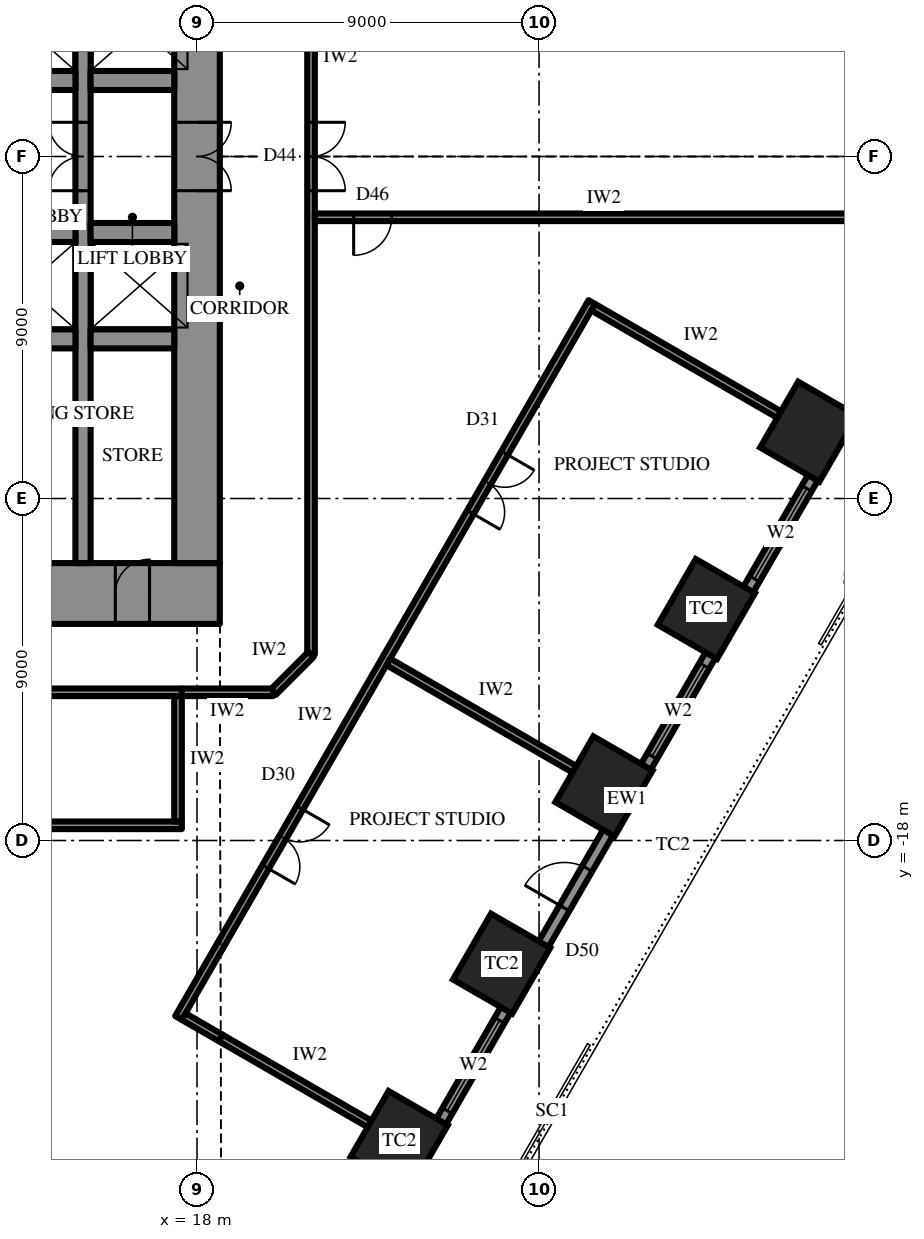
"""IFC4 building model, lengths in metres.
Left out: names, types, materials, properties, quantities, classifications, styles, units other than length and angle.
Written with IfcOpenShell. Run it as: python <this file> out.ifc"""

import sys

from ifc_helpers import new_model, si_unit, direction, frame, frame_2d, origin, origin_2d, place, context, subcontext, project, spatial, rectangle, extrude, element, fill, save


model = new_model("IFC4")
c1 = context("Model", 3, precision=1e-05, world=origin(), true_north=direction((0.0, 1.0)))
c2 = subcontext(c1, "Body", "Model", "MODEL_VIEW")
j1 = project(units=[si_unit("LENGTHUNIT", "METRE"), si_unit("PLANEANGLEUNIT", "RADIAN")], contexts=[c1])
p1 = place(None, origin())
s1 = spatial("IfcSite", under=j1, at=p1, CompositionType="ELEMENT")
p2 = place(p1, origin())
s2 = spatial("IfcBuilding", under=s1, at=p2, CompositionType="ELEMENT")
p3 = place(p2, frame((0.0, 0.0, 61.3)))
s3 = spatial("IfcBuildingStorey", under=s2, at=p3, CompositionType="ELEMENT", Elevation=61.3)
for number, where, z_axis, x_axis in (
    (1, (23.32, -25.908, 0.0), (0.0, 0.0, 1.0), (0.5, 0.866, 0.0)),
    (2, (26.014, -21.242, 0.0), (0.0, 0.0, 1.0), (0.5, 0.866, 0.0)),
    (3, (28.709, -16.575, 0.0), (0.0, 0.0, 1.0), (0.5, 0.866, 0.0)),
    (4, (31.403, -11.908, 0.0), (0.0, 0.0, 1.0), (0.5, 0.866, 0.0)),
    (5, (34.097, -7.242, 0.0), (0.0, 0.0, 1.0), (0.5, 0.866, 0.0)),
):
    element("IfcColumn", number, at=place(p3, frame(where, z_axis=z_axis, x_axis=x_axis)), inside=s3, PredefinedType="COLUMN", context=c2, shape_type="SweptSolid", body=[
        extrude(rectangle(XDim=2.0, YDim=1.8, at=origin_2d()), origin(), (0.0, 0.0, 1.0), 4.2),
    ])
p4 = place(p3, frame((18.6, -11.5, 0.0), z_axis=(0.0, 0.0, 1.0), x_axis=(-1.0, 0.0, 0.0)))
e6 = element("IfcWall", 6, at=p4, inside=s3, PredefinedType="SHEAR", context=c2, shape_type="SweptSolid", body=[
    extrude(rectangle(XDim=37.2, YDim=1.6, at=frame_2d((18.6, 0.0))), origin(), (0.0, 0.0, 1.0), 4.2),
])
p5 = place(p4, frame((19.45, 0.0, 0.0)))
e7 = element("IfcOpeningElement", 7, at=p5, cuts=e6, PredefinedType="OPENING", context=c2, shape_type="SweptSolid", body=[
    extrude(rectangle(XDim=0.9, YDim=2.2, at=frame_2d((0.45, 1.1))), frame((0.0, 0.81, 0.0), z_axis=(0.0, -1.0, 0.0), x_axis=(1.0, 0.0, 0.0)), (0.0, 0.0, 1.0), 1.62),
])
p6 = place(p4, frame((22.45, 0.0, 0.0)))
e8 = element("IfcOpeningElement", 8, at=p6, cuts=e6, PredefinedType="OPENING", context=c2, shape_type="SweptSolid", body=[
    extrude(rectangle(XDim=0.9, YDim=2.2, at=frame_2d((0.45, 1.1))), frame((0.0, 0.81, 0.0), z_axis=(0.0, -1.0, 0.0), x_axis=(1.0, 0.0, 0.0)), (0.0, 0.0, 1.0), 1.62),
])
p7 = place(p4, frame((25.5, 0.0, 0.0)))
e9 = element("IfcOpeningElement", 9, at=p7, cuts=e6, PredefinedType="OPENING", context=c2, shape_type="SweptSolid", body=[
    extrude(rectangle(XDim=1.0, YDim=2.2, at=frame_2d((0.5, 1.1))), frame((0.0, 0.81, 0.0), z_axis=(0.0, -1.0, 0.0), x_axis=(1.0, 0.0, 0.0)), (0.0, 0.0, 1.0), 1.62),
])
p8 = place(p4, frame((1.85, 0.0, 0.0)))
e10 = element("IfcOpeningElement", 10, at=p8, cuts=e6, PredefinedType="OPENING", context=c2, shape_type="SweptSolid", body=[
    extrude(rectangle(XDim=0.9, YDim=2.2, at=frame_2d((0.45, 1.1))), frame((0.0, 0.81, 0.0), z_axis=(0.0, -1.0, 0.0), x_axis=(1.0, 0.0, 0.0)), (0.0, 0.0, 1.0), 1.62),
])
p9 = place(p4, frame((4.6, 0.0, 0.0)))
e11 = element("IfcOpeningElement", 11, at=p9, cuts=e6, PredefinedType="OPENING", context=c2, shape_type="SweptSolid", body=[
    extrude(rectangle(XDim=0.9, YDim=2.2, at=frame_2d((0.45, 1.1))), frame((0.0, 0.81, 0.0), z_axis=(0.0, -1.0, 0.0), x_axis=(1.0, 0.0, 0.0)), (0.0, 0.0, 1.0), 1.62),
])
p10 = place(p4, frame((7.75, 0.0, 0.0)))
e12 = element("IfcOpeningElement", 12, at=p10, cuts=e6, PredefinedType="OPENING", context=c2, shape_type="SweptSolid", body=[
    extrude(rectangle(XDim=0.9, YDim=2.2, at=frame_2d((0.45, 1.1))), frame((0.0, 0.81, 0.0), z_axis=(0.0, -1.0, 0.0), x_axis=(1.0, 0.0, 0.0)), (0.0, 0.0, 1.0), 1.62),
])
p11 = place(p4, frame((28.55, 0.0, 0.0)))
e13 = element("IfcOpeningElement", 13, at=p11, cuts=e6, PredefinedType="OPENING", context=c2, shape_type="SweptSolid", body=[
    extrude(rectangle(XDim=0.9, YDim=2.2, at=frame_2d((0.45, 1.1))), frame((0.0, 0.81, 0.0), z_axis=(0.0, -1.0, 0.0), x_axis=(1.0, 0.0, 0.0)), (0.0, 0.0, 1.0), 1.62),
])
p12 = place(p4, frame((31.7, 0.0, 0.0)))
e14 = element("IfcOpeningElement", 14, at=p12, cuts=e6, PredefinedType="OPENING", context=c2, shape_type="SweptSolid", body=[
    extrude(rectangle(XDim=0.9, YDim=2.2, at=frame_2d((0.45, 1.1))), frame((0.0, 0.81, 0.0), z_axis=(0.0, -1.0, 0.0), x_axis=(1.0, 0.0, 0.0)), (0.0, 0.0, 1.0), 1.62),
])
p13 = place(p4, frame((34.45, 0.0, 0.0)))
e15 = element("IfcOpeningElement", 15, at=p13, cuts=e6, PredefinedType="OPENING", context=c2, shape_type="SweptSolid", body=[
    extrude(rectangle(XDim=0.9, YDim=2.2, at=frame_2d((0.45, 1.1))), frame((0.0, 0.81, 0.0), z_axis=(0.0, -1.0, 0.0), x_axis=(1.0, 0.0, 0.0)), (0.0, 0.0, 1.0), 1.62),
])
p14 = place(p3, frame((18.0, -10.7, 0.0), z_axis=(0.0, 0.0, 1.0), x_axis=(0.0, 1.0, 0.0)))
e16 = element("IfcWall", 16, at=p14, inside=s3, PredefinedType="SHEAR", context=c2, shape_type="SweptSolid", body=[
    extrude(rectangle(XDim=21.4, YDim=1.2, at=frame_2d((10.7, 0.0))), origin(), (0.0, 0.0, 1.0), 4.2),
])
p15 = place(p14, frame((9.8, 0.0, 0.0)))
e17 = element("IfcOpeningElement", 17, at=p15, cuts=e16, PredefinedType="OPENING", context=c2, shape_type="SweptSolid", body=[
    extrude(rectangle(XDim=1.8, YDim=2.4, at=frame_2d((0.9, 1.2))), frame((0.0, 0.61, 0.0), z_axis=(0.0, -1.0, 0.0), x_axis=(1.0, 0.0, 0.0)), (0.0, 0.0, 1.0), 1.22),
])
p16 = place(p3, frame((15.0, -10.7, 0.0), z_axis=(0.0, 0.0, 1.0), x_axis=(0.0, 1.0, 0.0)))
e18 = element("IfcWall", 18, at=p16, inside=s3, PredefinedType="SHEAR", context=c2, shape_type="SweptSolid", body=[
    extrude(rectangle(XDim=21.4, YDim=0.4, at=frame_2d((10.7, 0.0))), origin(), (0.0, 0.0, 1.0), 4.2),
])
p17 = place(p16, frame((9.8, 0.0, 0.0)))
e19 = element("IfcOpeningElement", 19, at=p17, cuts=e18, PredefinedType="OPENING", context=c2, shape_type="SweptSolid", body=[
    extrude(rectangle(XDim=1.8, YDim=2.4, at=frame_2d((0.9, 1.2))), frame((0.0, 0.21, 0.0), z_axis=(0.0, -1.0, 0.0), x_axis=(1.0, 0.0, 0.0)), (0.0, 0.0, 1.0), 0.42),
])
p18 = place(p3, frame((12.3, 2.0, 0.0), z_axis=(0.0, 0.0, 1.0), x_axis=(1.0, 0.0, 0.0)))
e20 = element("IfcWall", 20, at=p18, inside=s3, PredefinedType="SHEAR", context=c2, shape_type="SweptSolid", body=[
    extrude(rectangle(XDim=2.5, YDim=0.5, at=frame_2d((1.25, 0.0))), origin(), (0.0, 0.0, 1.0), 4.2),
])
for number, where, z_axis, x_axis in (
    (21, (15.2, 2.0, 0.0), (0.0, 0.0, 1.0), (1.0, 0.0, 0.0)),
    (22, (17.4, -2.0, 0.0), (0.0, 0.0, 1.0), (-1.0, 0.0, 0.0)),
):
    element("IfcWall", number, at=place(p3, frame(where, z_axis=z_axis, x_axis=x_axis)), inside=s3, PredefinedType="SHEAR", context=c2, shape_type="SweptSolid", body=[
        extrude(rectangle(XDim=2.2, YDim=0.5, at=frame_2d((1.1, 0.0))), origin(), (0.0, 0.0, 1.0), 4.2),
    ])
p19 = place(p3, frame((14.8, -2.0, 0.0), z_axis=(0.0, 0.0, 1.0), x_axis=(-1.0, 0.0, 0.0)))
e23 = element("IfcWall", 23, at=p19, inside=s3, PredefinedType="SHEAR", context=c2, shape_type="SweptSolid", body=[
    extrude(rectangle(XDim=2.5, YDim=0.5, at=frame_2d((1.25, 0.0))), origin(), (0.0, 0.0, 1.0), 4.2),
])
p20 = place(p3, frame((17.4, -4.8, 0.0), z_axis=(0.0, 0.0, 1.0), x_axis=(-1.0, 0.0, 0.0)))
e24 = element("IfcWall", 24, at=p20, inside=s3, PredefinedType="SHEAR", context=c2, shape_type="SweptSolid", body=[
    extrude(rectangle(XDim=2.2, YDim=0.5, at=frame_2d((1.1, 0.0))), origin(), (0.0, 0.0, 1.0), 4.2),
])
p21 = place(p3, frame((14.8, -4.8, 0.0), z_axis=(0.0, 0.0, 1.0), x_axis=(-1.0, 0.0, 0.0)))
e25 = element("IfcWall", 25, at=p21, inside=s3, PredefinedType="SHEAR", context=c2, shape_type="SweptSolid", body=[
    extrude(rectangle(XDim=2.5, YDim=0.5, at=frame_2d((1.25, 0.0))), origin(), (0.0, 0.0, 1.0), 4.2),
])
p22 = place(p3, frame((21.232, -30.925, 0.0), z_axis=(0.0, 0.0, 1.0), x_axis=(0.499999163675, 0.866025886636, 0.0)))
e26 = element("IfcWall", 26, at=p22, inside=s3, PredefinedType="SOLIDWALL", context=c2, shape_type="SweptSolid", body=[
    extrude(rectangle(XDim=32.332, YDim=0.3, at=frame_2d((16.166, 0.0))), origin(), (0.0, 0.0, 1.0), 2.7),
])
p23 = place(p22, frame((1.319, 0.0, 0.6)))
e27 = element("IfcOpeningElement", 27, at=p23, cuts=e26, PredefinedType="OPENING", context=c2, shape_type="SweptSolid", body=[
    extrude(rectangle(XDim=2.75, YDim=1.85, at=frame_2d((1.375, 0.925))), frame((0.0, 0.16, 0.0), z_axis=(0.0, -1.0, 0.0), x_axis=(1.0, 0.0, 0.0)), (0.0, 0.0, 1.0), 0.32),
])
p24 = place(p22, frame((6.708, 0.0, 0.6)))
e28 = element("IfcOpeningElement", 28, at=p24, cuts=e26, PredefinedType="OPENING", context=c2, shape_type="SweptSolid", body=[
    extrude(rectangle(XDim=2.75, YDim=1.85, at=frame_2d((1.375, 0.925))), frame((0.0, 0.16, 0.0), z_axis=(0.0, -1.0, 0.0), x_axis=(1.0, 0.0, 0.0)), (0.0, 0.0, 1.0), 0.32),
])
p25 = place(p22, frame((12.872, 0.0, 0.0)))
e29 = element("IfcOpeningElement", 29, at=p25, cuts=e26, PredefinedType="OPENING", context=c2, shape_type="SweptSolid", body=[
    extrude(rectangle(XDim=1.2, YDim=2.4, at=frame_2d((0.6, 1.2))), frame((0.0, 0.16, 0.0), z_axis=(0.0, -1.0, 0.0), x_axis=(1.0, 0.0, 0.0)), (0.0, 0.0, 1.0), 0.32),
])
p26 = place(p22, frame((17.485, 0.0, 0.6)))
e30 = element("IfcOpeningElement", 30, at=p26, cuts=e26, PredefinedType="OPENING", context=c2, shape_type="SweptSolid", body=[
    extrude(rectangle(XDim=2.75, YDim=1.85, at=frame_2d((1.375, 0.925))), frame((0.0, 0.16, 0.0), z_axis=(0.0, -1.0, 0.0), x_axis=(1.0, 0.0, 0.0)), (0.0, 0.0, 1.0), 0.32),
])
p27 = place(p22, frame((22.874, 0.0, 0.6)))
e31 = element("IfcOpeningElement", 31, at=p27, cuts=e26, PredefinedType="OPENING", context=c2, shape_type="SweptSolid", body=[
    extrude(rectangle(XDim=2.75, YDim=1.85, at=frame_2d((1.375, 0.925))), frame((0.0, 0.16, 0.0), z_axis=(0.0, -1.0, 0.0), x_axis=(1.0, 0.0, 0.0)), (0.0, 0.0, 1.0), 0.32),
])
p28 = place(p22, frame((28.262, 0.0, 0.6)))
e32 = element("IfcOpeningElement", 32, at=p28, cuts=e26, PredefinedType="OPENING", context=c2, shape_type="SweptSolid", body=[
    extrude(rectangle(XDim=2.75, YDim=1.85, at=frame_2d((1.375, 0.925))), frame((0.0, 0.16, 0.0), z_axis=(0.0, -1.0, 0.0), x_axis=(1.0, 0.0, 0.0)), (0.0, 0.0, 1.0), 0.32),
])
p29 = place(p3, frame((17.6, -14.1, 0.0), z_axis=(0.0, 0.0, 1.0), x_axis=(-1.0, 0.0, 0.0)))
e33 = element("IfcWall", 33, at=p29, inside=s3, PredefinedType="PARTITIONING", context=c2, shape_type="SweptSolid", body=[
    extrude(rectangle(XDim=35.2, YDim=0.2, at=frame_2d((17.6, 0.0))), origin(), (0.0, 0.0, 1.0), 4.0),
])
p30 = place(p3, frame((17.6, -17.6, 0.0), z_axis=(0.0, 0.0, 1.0), x_axis=(-1.0, 0.0, 0.0)))
e34 = element("IfcWall", 34, at=p30, inside=s3, PredefinedType="PARTITIONING", context=c2, shape_type="SweptSolid", body=[
    extrude(rectangle(XDim=35.2, YDim=0.2, at=frame_2d((17.6, 0.0))), origin(), (0.0, 0.0, 1.0), 4.0),
])
p31 = place(p30, frame((16.7, 0.0, 0.0)))
e35 = element("IfcOpeningElement", 35, at=p31, cuts=e34, PredefinedType="OPENING", context=c2, shape_type="SweptSolid", body=[
    extrude(rectangle(XDim=1.8, YDim=2.4, at=frame_2d((0.9, 1.2))), frame((0.0, 0.11, 0.0), z_axis=(0.0, -1.0, 0.0), x_axis=(1.0, 0.0, 0.0)), (0.0, 0.0, 1.0), 0.22),
])
p32 = place(p3, frame((17.5, -14.2, 0.0), z_axis=(0.0, 0.0, 1.0), x_axis=(0.0, -1.0, 0.0)))
e36 = element("IfcWall", 36, at=p32, inside=s3, PredefinedType="PARTITIONING", context=c2, shape_type="SweptSolid", body=[
    extrude(rectangle(XDim=3.3, YDim=0.2, at=frame_2d((1.65, 0.0))), origin(), (0.0, 0.0, 1.0), 4.0),
])
p33 = place(p3, frame((17.511, -22.67, 0.0), z_axis=(0.0, 0.0, 1.0), x_axis=(0.500000289772, 0.866025236485, 0.0)))
e37 = element("IfcWall", 37, at=p33, inside=s3, PredefinedType="PARTITIONING", context=c2, shape_type="SweptSolid", body=[
    extrude(rectangle(XDim=21.754, YDim=0.2, at=frame_2d((10.877, 0.0))), origin(), (0.0, 0.0, 1.0), 4.0),
])
p34 = place(p33, frame((4.589, 0.0, 0.0)))
e38 = element("IfcOpeningElement", 38, at=p34, cuts=e37, PredefinedType="OPENING", context=c2, shape_type="SweptSolid", body=[
    extrude(rectangle(XDim=1.8, YDim=2.4, at=frame_2d((0.9, 1.2))), frame((0.0, 0.11, 0.0), z_axis=(0.0, -1.0, 0.0), x_axis=(1.0, 0.0, 0.0)), (0.0, 0.0, 1.0), 0.22),
])
p35 = place(p33, frame((15.366, 0.0, 0.0)))
e39 = element("IfcOpeningElement", 39, at=p35, cuts=e37, PredefinedType="OPENING", context=c2, shape_type="SweptSolid", body=[
    extrude(rectangle(XDim=1.8, YDim=2.4, at=frame_2d((0.9, 1.2))), frame((0.0, 0.11, 0.0), z_axis=(0.0, -1.0, 0.0), x_axis=(1.0, 0.0, 0.0)), (0.0, 0.0, 1.0), 0.22),
])
p36 = place(p3, frame((17.648, -22.633, 0.0), z_axis=(0.0, 0.0, 1.0), x_axis=(0.86603400694, -0.499985098601, 0.0)))
e40 = element("IfcWall", 40, at=p36, inside=s3, PredefinedType="PARTITIONING", context=c2, shape_type="SweptSolid", body=[
    extrude(rectangle(XDim=1.126, YDim=0.2, at=frame_2d((0.563, 0.0))), origin(), (0.0, 0.0, 1.0), 4.0),
])
p37 = place(p3, frame((18.623, -23.197, 0.0), z_axis=(0.0, 0.0, 1.0), x_axis=(0.866029199568, -0.499993425452, 0.0)))
e41 = element("IfcWall", 41, at=p37, inside=s3, PredefinedType="PARTITIONING", context=c2, shape_type="SweptSolid", body=[
    extrude(rectangle(XDim=4.523, YDim=0.2, at=frame_2d((2.262, 0.0))), origin(), (0.0, 0.0, 1.0), 2.992),
])
p38 = place(p3, frame((23.036, -13.3, 0.0), z_axis=(0.0, 0.0, 1.0), x_axis=(0.866019355129, -0.500010476433, 0.0)))
e42 = element("IfcWall", 42, at=p38, inside=s3, PredefinedType="PARTITIONING", context=c2, shape_type="SweptSolid", body=[
    extrude(rectangle(XDim=5.65, YDim=0.2, at=frame_2d((2.825, 0.0))), origin(), (0.0, 0.0, 1.0), 4.0),
])
p39 = place(p3, frame((28.425, -3.967, 0.0), z_axis=(0.0, 0.0, 1.0), x_axis=(0.866011447264, -0.500024172624, 0.0)))
e43 = element("IfcWall", 43, at=p39, inside=s3, PredefinedType="PARTITIONING", context=c2, shape_type="SweptSolid", body=[
    extrude(rectangle(XDim=5.65, YDim=0.2, at=frame_2d((2.825, 0.0))), origin(), (0.0, 0.0, 1.0), 2.944),
])
p40 = place(p3, frame((21.0, 13.1, 0.0), z_axis=(0.0, 0.0, 1.0), x_axis=(0.0, -1.0, 0.0)))
e44 = element("IfcWall", 44, at=p40, inside=s3, PredefinedType="PARTITIONING", context=c2, shape_type="SweptSolid", body=[
    extrude(rectangle(XDim=26.2, YDim=0.2, at=frame_2d((13.1, 0.0))), origin(), (0.0, 0.0, 1.0), 4.0),
])
p41 = place(p40, frame((12.2, 0.0, 0.0)))
e45 = element("IfcOpeningElement", 45, at=p41, cuts=e44, PredefinedType="OPENING", context=c2, shape_type="SweptSolid", body=[
    extrude(rectangle(XDim=1.8, YDim=2.4, at=frame_2d((0.9, 1.2))), frame((0.0, 0.11, 0.0), z_axis=(0.0, -1.0, 0.0), x_axis=(1.0, 0.0, 0.0)), (0.0, 0.0, 1.0), 0.22),
])
p42 = place(p3, frame((21.0, -13.1, 0.0), z_axis=(0.0, 0.0, 1.0), x_axis=(-0.707106781187, -0.707106781187, 0.0)))
e46 = element("IfcWall", 46, at=p42, inside=s3, PredefinedType="PARTITIONING", context=c2, shape_type="SweptSolid", body=[
    extrude(rectangle(XDim=1.414, YDim=0.2, at=frame_2d((0.707, 0.0))), origin(), (0.0, 0.0, 1.0), 4.0),
])
p43 = place(p3, frame((20.0, -14.1, 0.0), z_axis=(0.0, 0.0, 1.0), x_axis=(-1.0, 0.0, 0.0)))
e47 = element("IfcWall", 47, at=p43, inside=s3, PredefinedType="PARTITIONING", context=c2, shape_type="SweptSolid", body=[
    extrude(rectangle(XDim=2.4, YDim=0.2, at=frame_2d((1.2, 0.0))), origin(), (0.0, 0.0, 1.0), 4.0),
])
p44 = place(p3, frame((21.1, -1.6, 0.0), z_axis=(0.0, 0.0, 1.0), x_axis=(1.0, 0.0, 0.0)))
e48 = element("IfcWall", 48, at=p44, inside=s3, PredefinedType="PARTITIONING", context=c2, shape_type="SweptSolid", body=[
    extrude(rectangle(XDim=15.215, YDim=0.2, at=frame_2d((7.608, 0.0))), origin(), (0.0, 0.0, 1.0), 4.0),
])
p45 = place(p44, frame((1.021, 0.0, 0.0)))
e49 = element("IfcOpeningElement", 49, at=p45, cuts=e48, PredefinedType="OPENING", context=c2, shape_type="SweptSolid", body=[
    extrude(rectangle(XDim=1.0, YDim=2.2, at=frame_2d((0.5, 1.1))), frame((0.0, 0.11, 0.0), z_axis=(0.0, -1.0, 0.0), x_axis=(1.0, 0.0, 0.0)), (0.0, 0.0, 1.0), 0.22),
])
p46 = place(p24, origin())
e50 = element("IfcWindow", 50, at=p46, inside=s3, PartitioningType="SINGLE_PANEL", PredefinedType="WINDOW", context=c2, shape_type="SweptSolid", body=[
    extrude(rectangle(XDim=2.75, YDim=1.85, at=frame_2d((1.375, 0.925))), frame((0.0, 0.03, 0.0), z_axis=(0.0, -1.0, 0.0), x_axis=(1.0, 0.0, 0.0)), (0.0, 0.0, 1.0), 0.06),
])
fill(e28, e50)
p47 = place(p25, origin())
e51 = element("IfcDoor", 51, at=p47, inside=s3, OperationType="SINGLE_SWING_RIGHT", PredefinedType="DOOR", context=c2, shape_type="SweptSolid", body=[
    extrude(rectangle(XDim=1.2, YDim=2.4, at=frame_2d((0.6, 1.2))), frame((0.0, 0.025, 0.0), z_axis=(0.0, -1.0, 0.0), x_axis=(1.0, 0.0, 0.0)), (0.0, 0.0, 1.0), 0.05),
])
fill(e29, e51)
p48 = place(p26, origin())
e52 = element("IfcWindow", 52, at=p48, inside=s3, PartitioningType="SINGLE_PANEL", PredefinedType="WINDOW", context=c2, shape_type="SweptSolid", body=[
    extrude(rectangle(XDim=2.75, YDim=1.85, at=frame_2d((1.375, 0.925))), frame((0.0, 0.03, 0.0), z_axis=(0.0, -1.0, 0.0), x_axis=(1.0, 0.0, 0.0)), (0.0, 0.0, 1.0), 0.06),
])
fill(e30, e52)
p49 = place(p27, origin())
e53 = element("IfcWindow", 53, at=p49, inside=s3, PartitioningType="SINGLE_PANEL", PredefinedType="WINDOW", context=c2, shape_type="SweptSolid", body=[
    extrude(rectangle(XDim=2.75, YDim=1.85, at=frame_2d((1.375, 0.925))), frame((0.0, 0.03, 0.0), z_axis=(0.0, -1.0, 0.0), x_axis=(1.0, 0.0, 0.0)), (0.0, 0.0, 1.0), 0.06),
])
fill(e31, e53)
p50 = place(p15, frame((1.8, 0.0, 0.0), z_axis=(0.0, 0.0, 1.0), x_axis=(-1.0, 0.0, 0.0)))
e54 = element("IfcDoor", 54, at=p50, inside=s3, OperationType="DOUBLE_DOOR_SINGLE_SWING", PredefinedType="DOOR", context=c2, shape_type="SweptSolid", body=[
    extrude(rectangle(XDim=1.8, YDim=2.4, at=frame_2d((0.9, 1.2))), frame((0.0, 0.025, 0.0), z_axis=(0.0, -1.0, 0.0), x_axis=(1.0, 0.0, 0.0)), (0.0, 0.0, 1.0), 0.05),
])
fill(e17, e54)
p51 = place(p8, frame((0.9, 0.0, 0.0), z_axis=(0.0, 0.0, 1.0), x_axis=(-1.0, 0.0, 0.0)))
e55 = element("IfcDoor", 55, at=p51, inside=s3, OperationType="SINGLE_SWING_LEFT", PredefinedType="DOOR", context=c2, shape_type="SweptSolid", body=[
    extrude(rectangle(XDim=0.9, YDim=2.2, at=frame_2d((0.45, 1.1))), frame((0.0, 0.025, 0.0), z_axis=(0.0, -1.0, 0.0), x_axis=(1.0, 0.0, 0.0)), (0.0, 0.0, 1.0), 0.05),
])
fill(e10, e55)
p52 = place(p17, origin())
e56 = element("IfcDoor", 56, at=p52, inside=s3, OperationType="DOUBLE_DOOR_SINGLE_SWING", PredefinedType="DOOR", context=c2, shape_type="SweptSolid", body=[
    extrude(rectangle(XDim=1.8, YDim=2.4, at=frame_2d((0.9, 1.2))), frame((0.0, 0.025, 0.0), z_axis=(0.0, -1.0, 0.0), x_axis=(1.0, 0.0, 0.0)), (0.0, 0.0, 1.0), 0.05),
])
fill(e19, e56)
p53 = place(p34, frame((1.8, 0.0, 0.0), z_axis=(0.0, 0.0, 1.0), x_axis=(-1.0, 0.0, 0.0)))
e57 = element("IfcDoor", 57, at=p53, inside=s3, OperationType="DOUBLE_DOOR_SINGLE_SWING", PredefinedType="DOOR", context=c2, shape_type="SweptSolid", body=[
    extrude(rectangle(XDim=1.8, YDim=2.4, at=frame_2d((0.9, 1.2))), frame((0.0, 0.025, 0.0), z_axis=(0.0, -1.0, 0.0), x_axis=(1.0, 0.0, 0.0)), (0.0, 0.0, 1.0), 0.05),
])
fill(e38, e57)
p54 = place(p35, frame((1.8, 0.0, 0.0), z_axis=(0.0, 0.0, 1.0), x_axis=(-1.0, 0.0, 0.0)))
e58 = element("IfcDoor", 58, at=p54, inside=s3, OperationType="DOUBLE_DOOR_SINGLE_SWING", PredefinedType="DOOR", context=c2, shape_type="SweptSolid", body=[
    extrude(rectangle(XDim=1.8, YDim=2.4, at=frame_2d((0.9, 1.2))), frame((0.0, 0.025, 0.0), z_axis=(0.0, -1.0, 0.0), x_axis=(1.0, 0.0, 0.0)), (0.0, 0.0, 1.0), 0.05),
])
fill(e39, e58)
p55 = place(p41, origin())
e59 = element("IfcDoor", 59, at=p55, inside=s3, OperationType="DOUBLE_DOOR_SINGLE_SWING", PredefinedType="DOOR", context=c2, shape_type="SweptSolid", body=[
    extrude(rectangle(XDim=1.8, YDim=2.4, at=frame_2d((0.9, 1.2))), frame((0.0, 0.025, 0.0), z_axis=(0.0, -1.0, 0.0), x_axis=(1.0, 0.0, 0.0)), (0.0, 0.0, 1.0), 0.05),
])
fill(e45, e59)
p56 = place(p45, frame((1.0, 0.0, 0.0), z_axis=(0.0, 0.0, 1.0), x_axis=(-1.0, 0.0, 0.0)))
e60 = element("IfcDoor", 60, at=p56, inside=s3, OperationType="SINGLE_SWING_LEFT", PredefinedType="DOOR", context=c2, shape_type="SweptSolid", body=[
    extrude(rectangle(XDim=1.0, YDim=2.2, at=frame_2d((0.5, 1.1))), frame((0.0, 0.025, 0.0), z_axis=(0.0, -1.0, 0.0), x_axis=(1.0, 0.0, 0.0)), (0.0, 0.0, 1.0), 0.05),
])
fill(e49, e60)
save(model, sys.argv[1])
